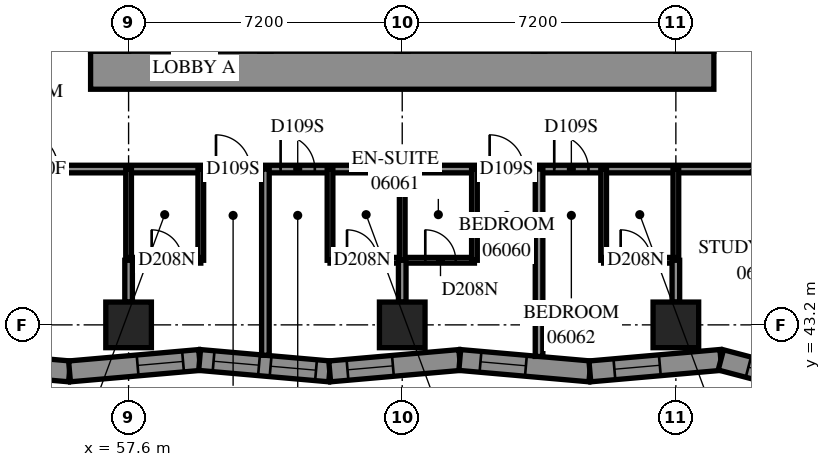
"""IFC4 building model, lengths in metres.
Left out: names, types, materials, properties, quantities, classifications, styles, units other than length and angle.
Written with IfcOpenShell. Run it as: python <this file> out.ifc"""

import sys

from ifc_helpers import new_model, si_unit, direction, frame, frame_2d, origin, origin_2d, place, context, subcontext, project, spatial, polyline, rectangle, outline, extrude, element, fill, save


model = new_model("IFC4")
c1 = context("Model", 3, precision=1e-05, world=origin(), true_north=direction((0.0, 1.0)))
c2 = subcontext(c1, "Body", "Model", "MODEL_VIEW")
j1 = project(units=[si_unit("LENGTHUNIT", "METRE"), si_unit("PLANEANGLEUNIT", "RADIAN")], contexts=[c1])
p1 = place(None, origin())
s1 = spatial("IfcSite", under=j1, at=p1, CompositionType="ELEMENT")
p2 = place(p1, origin())
s2 = spatial("IfcBuilding", under=s1, at=p2, CompositionType="ELEMENT")
p3 = place(p2, frame((0.0, 0.0, 27.0)))
s3 = spatial("IfcBuildingStorey", under=s2, at=p3, CompositionType="ELEMENT", Elevation=27.0)
for number, where, z_axis, x_axis in (
    (1, (57.6, 43.2, 0.0), (0.0, 0.0, 1.0), (1.0, 0.0, 0.0)),
    (2, (64.8, 43.2, 0.0), (0.0, 0.0, 1.0), (1.0, 0.0, 0.0)),
    (3, (72.0, 43.2, 0.0), (0.0, 0.0, 1.0), (1.0, 0.0, 0.0)),
):
    element("IfcColumn", number, at=place(p3, frame(where, z_axis=z_axis, x_axis=x_axis)), inside=s3, PredefinedType="COLUMN", context=c2, shape_type="SweptSolid", body=[
        extrude(rectangle(XDim=1.2, YDim=1.2, at=origin_2d()), origin(), (0.0, 0.0, 1.0), 3.1),
    ])
p4 = place(p3, frame((56.6, 49.9, -0.3), z_axis=(0.0, 0.0, 1.0), x_axis=(1.0, 0.0, 0.0)))
e4 = element("IfcWall", 4, at=p4, inside=s3, PredefinedType="SHEAR", context=c2, shape_type="SweptSolid", body=[
    extrude(rectangle(XDim=16.4, YDim=1.0, at=frame_2d((8.2, 0.0))), origin(), (0.0, 0.0, 1.0), 2.7),
])
p5 = place(p3, frame((52.599, 42.278, 0.0), z_axis=(0.0, 0.0, 1.0), x_axis=(0.9961831061, -0.0872881385, 0.0)))
e5 = element("IfcWall", 5, at=p5, inside=s3, PredefinedType="SOLIDWALL", context=c2, shape_type="SweptSolid", body=[
    extrude(outline(polyline([(0.048, -0.275), (3.484, -0.275), (3.436, 0.275), (-0.048, 0.275), (0.048, -0.275)])), origin(), (0.0, 0.0, 1.0), 3.1),
])
p6 = place(p5, frame((1.721, 0.0, 0.5)))
e6 = element("IfcOpeningElement", 6, at=p6, cuts=e5, PredefinedType="OPENING", context=c2, shape_type="SweptSolid", body=[
    extrude(rectangle(XDim=1.2, YDim=2.45, at=frame_2d((0.6, 1.225))), frame((0.0, 0.285, 0.0), z_axis=(0.0, -1.0, 0.0), x_axis=(1.0, 0.0, 0.0)), (0.0, 0.0, 1.0), 0.57),
])
p7 = place(p3, frame((56.046, 41.976, 0.0), z_axis=(0.0, 0.0, 1.0), x_axis=(0.996181166, 0.0873102778, 0.0)))
e7 = element("IfcWall", 7, at=p7, inside=s3, PredefinedType="SOLIDWALL", context=c2, shape_type="SweptSolid", body=[
    extrude(outline(polyline([(-0.024, -0.275), (3.412, -0.275), (3.46, 0.275), (0.024, 0.275), (-0.024, -0.275)])), origin(), (0.0, 0.0, 1.0), 3.1),
])
p8 = place(p7, frame((1.798, 0.0, 0.5)))
e8 = element("IfcOpeningElement", 8, at=p8, cuts=e7, PredefinedType="OPENING", context=c2, shape_type="SweptSolid", body=[
    extrude(rectangle(XDim=1.2, YDim=2.45, at=frame_2d((0.6, 1.225))), frame((0.0, 0.285, 0.0), z_axis=(0.0, -1.0, 0.0), x_axis=(1.0, 0.0, 0.0)), (0.0, 0.0, 1.0), 0.57),
])
p9 = place(p3, frame((59.469, 42.276, 0.0), z_axis=(0.0, 0.0, 1.0), x_axis=(0.996181166, -0.0873102778, 0.0)))
e9 = element("IfcWall", 9, at=p9, inside=s3, PredefinedType="SOLIDWALL", context=c2, shape_type="SweptSolid", body=[
    extrude(outline(polyline([(0.024, -0.275), (3.46, -0.275), (3.412, 0.275), (-0.024, 0.275), (0.024, -0.275)])), origin(), (0.0, 0.0, 1.0), 3.1),
])
p10 = place(p9, frame((0.369, 0.0, 0.5)))
e10 = element("IfcOpeningElement", 10, at=p10, cuts=e9, PredefinedType="OPENING", context=c2, shape_type="SweptSolid", body=[
    extrude(rectangle(XDim=1.2, YDim=2.45, at=frame_2d((0.6, 1.225))), frame((0.0, 0.285, 0.0), z_axis=(0.0, -1.0, 0.0), x_axis=(1.0, 0.0, 0.0)), (0.0, 0.0, 1.0), 0.57),
])
p11 = place(p9, frame((1.875, 0.0, 0.5)))
e11 = element("IfcOpeningElement", 11, at=p11, cuts=e9, PredefinedType="OPENING", context=c2, shape_type="SweptSolid", body=[
    extrude(rectangle(XDim=1.2, YDim=2.45, at=frame_2d((0.6, 1.225))), frame((0.0, 0.285, 0.0), z_axis=(0.0, -1.0, 0.0), x_axis=(1.0, 0.0, 0.0)), (0.0, 0.0, 1.0), 0.57),
])
p12 = place(p3, frame((62.892, 41.976, 0.0), z_axis=(0.0, 0.0, 1.0), x_axis=(0.9961809441, 0.0873128092, 0.0)))
e12 = element("IfcWall", 12, at=p12, inside=s3, PredefinedType="SOLIDWALL", context=c2, shape_type="SweptSolid", body=[
    extrude(outline(polyline([(-0.024, -0.275), (3.412, -0.275), (3.46, 0.275), (0.024, 0.275), (-0.024, -0.275)])), origin(), (0.0, 0.0, 1.0), 3.1),
])
p13 = place(p12, frame((0.47, 0.0, 0.5)))
e13 = element("IfcOpeningElement", 13, at=p13, cuts=e12, PredefinedType="OPENING", context=c2, shape_type="SweptSolid", body=[
    extrude(rectangle(XDim=1.2, YDim=2.45, at=frame_2d((0.6, 1.225))), frame((0.0, 0.285, 0.0), z_axis=(0.0, -1.0, 0.0), x_axis=(1.0, 0.0, 0.0)), (0.0, 0.0, 1.0), 0.57),
])
p14 = place(p3, frame((66.314, 42.276, 0.0), z_axis=(0.0, 0.0, 1.0), x_axis=(0.996181166, -0.0873102778, 0.0)))
e14 = element("IfcWall", 14, at=p14, inside=s3, PredefinedType="SOLIDWALL", context=c2, shape_type="SweptSolid", body=[
    extrude(outline(polyline([(0.024, -0.275), (3.46, -0.275), (3.412, 0.275), (-0.024, 0.275), (0.024, -0.275)])), origin(), (0.0, 0.0, 1.0), 3.1),
])
p15 = place(p14, frame((0.547, 0.0, 0.5)))
e15 = element("IfcOpeningElement", 15, at=p15, cuts=e14, PredefinedType="OPENING", context=c2, shape_type="SweptSolid", body=[
    extrude(rectangle(XDim=1.2, YDim=2.45, at=frame_2d((0.6, 1.225))), frame((0.0, 0.285, 0.0), z_axis=(0.0, -1.0, 0.0), x_axis=(1.0, 0.0, 0.0)), (0.0, 0.0, 1.0), 0.57),
])
p16 = place(p3, frame((69.737, 41.976, 0.0), z_axis=(0.0, 0.0, 1.0), x_axis=(0.9961831061, 0.0872881385, 0.0)))
e16 = element("IfcWall", 16, at=p16, inside=s3, PredefinedType="SOLIDWALL", context=c2, shape_type="SweptSolid", body=[
    extrude(outline(polyline([(-0.024, -0.275), (3.412, -0.275), (3.508, 0.275), (0.024, 0.275), (-0.024, -0.275)])), origin(), (0.0, 0.0, 1.0), 3.1),
])
p17 = place(p16, frame((0.648, 0.0, 0.5)))
e17 = element("IfcOpeningElement", 17, at=p17, cuts=e16, PredefinedType="OPENING", context=c2, shape_type="SweptSolid", body=[
    extrude(rectangle(XDim=1.2, YDim=2.45, at=frame_2d((0.6, 1.225))), frame((0.0, 0.285, 0.0), z_axis=(0.0, -1.0, 0.0), x_axis=(1.0, 0.0, 0.0)), (0.0, 0.0, 1.0), 0.57),
])
p18 = place(p3, frame((73.184, 42.278, 0.0), z_axis=(0.0, 0.0, 1.0), x_axis=(0.9671305585, -0.2542803232, 0.0)))
e18 = element("IfcWall", 18, at=p18, inside=s3, PredefinedType="SOLIDWALL", context=c2, shape_type="SweptSolid", body=[
    extrude(outline(polyline([(0.048, -0.275), (3.587, -0.275), (3.67, 0.275), (-0.048, 0.275), (0.048, -0.275)])), origin(), (0.0, 0.0, 1.0), 3.1),
])
p19 = place(p18, frame((0.749, 0.0, 0.5)))
e19 = element("IfcOpeningElement", 19, at=p19, cuts=e18, PredefinedType="OPENING", context=c2, shape_type="SweptSolid", body=[
    extrude(rectangle(XDim=1.2, YDim=2.45, at=frame_2d((0.6, 1.225))), frame((0.0, 0.285, 0.0), z_axis=(0.0, -1.0, 0.0), x_axis=(1.0, 0.0, 0.0)), (0.0, 0.0, 1.0), 0.57),
])
p20 = place(p3, frame((54.5, 47.3, 0.0), z_axis=(0.0, 0.0, 1.0), x_axis=(1.0, 0.0, 0.0)))
e20 = element("IfcWall", 20, at=p20, inside=s3, PredefinedType="PARTITIONING", context=c2, shape_type="SweptSolid", body=[
    extrude(rectangle(XDim=19.56, YDim=0.2, at=frame_2d((9.78, 0.0))), origin(), (0.0, 0.0, 1.0), 3.1),
])
p21 = place(p20, frame((0.243, 0.0, 0.0)))
e21 = element("IfcOpeningElement", 21, at=p21, cuts=e20, PredefinedType="OPENING", context=c2, shape_type="SweptSolid", body=[
    extrude(rectangle(XDim=1.0, YDim=2.1, at=frame_2d((0.5, 1.05))), frame((0.0, 0.11, 0.0), z_axis=(0.0, -1.0, 0.0), x_axis=(1.0, 0.0, 0.0)), (0.0, 0.0, 1.0), 0.22),
])
p22 = place(p20, frame((5.4, 0.0, 0.0)))
e22 = element("IfcOpeningElement", 22, at=p22, cuts=e20, PredefinedType="OPENING", context=c2, shape_type="SweptSolid", body=[
    extrude(rectangle(XDim=0.9, YDim=2.1, at=frame_2d((0.45, 1.05))), frame((0.0, 0.11, 0.0), z_axis=(0.0, -1.0, 0.0), x_axis=(1.0, 0.0, 0.0)), (0.0, 0.0, 1.0), 0.22),
])
p23 = place(p20, frame((7.1, 0.0, 0.0)))
e23 = element("IfcOpeningElement", 23, at=p23, cuts=e20, PredefinedType="OPENING", context=c2, shape_type="SweptSolid", body=[
    extrude(rectangle(XDim=0.9, YDim=2.1, at=frame_2d((0.45, 1.05))), frame((0.0, 0.11, 0.0), z_axis=(0.0, -1.0, 0.0), x_axis=(1.0, 0.0, 0.0)), (0.0, 0.0, 1.0), 0.22),
])
p24 = place(p20, frame((12.6, 0.0, 0.0)))
e24 = element("IfcOpeningElement", 24, at=p24, cuts=e20, PredefinedType="OPENING", context=c2, shape_type="SweptSolid", body=[
    extrude(rectangle(XDim=0.9, YDim=2.1, at=frame_2d((0.45, 1.05))), frame((0.0, 0.11, 0.0), z_axis=(0.0, -1.0, 0.0), x_axis=(1.0, 0.0, 0.0)), (0.0, 0.0, 1.0), 0.22),
])
p25 = place(p20, frame((14.3, 0.0, 0.0)))
e25 = element("IfcOpeningElement", 25, at=p25, cuts=e20, PredefinedType="OPENING", context=c2, shape_type="SweptSolid", body=[
    extrude(rectangle(XDim=0.9, YDim=2.1, at=frame_2d((0.45, 1.05))), frame((0.0, 0.11, 0.0), z_axis=(0.0, -1.0, 0.0), x_axis=(1.0, 0.0, 0.0)), (0.0, 0.0, 1.0), 0.22),
])
p26 = place(p3, frame((68.4, 42.369, 0.0), z_axis=(0.0, 0.0, 1.0), x_axis=(0.0, 1.0, 0.0)))
e26 = element("IfcWall", 26, at=p26, inside=s3, PredefinedType="PARTITIONING", context=c2, shape_type="SweptSolid", body=[
    extrude(rectangle(XDim=4.931, YDim=0.2, at=frame_2d((2.465, 0.0))), origin(), (0.0, 0.0, 1.0), 3.1),
])
p27 = place(p3, frame((61.2, 42.4, 0.0), z_axis=(0.0, 0.0, 1.0), x_axis=(0.0, 1.0, 0.0)))
e27 = element("IfcWall", 27, at=p27, inside=s3, PredefinedType="PARTITIONING", context=c2, shape_type="SweptSolid", body=[
    extrude(rectangle(XDim=4.9, YDim=0.2, at=frame_2d((2.45, 0.0))), origin(), (0.0, 0.0, 1.0), 3.1),
])
p28 = place(p3, frame((74.057, 47.297, 0.0), z_axis=(0.0, 0.0, 1.0), x_axis=(0.7071067812, -0.7071067812, 0.0)))
e28 = element("IfcWall", 28, at=p28, inside=s3, PredefinedType="PARTITIONING", context=c2, shape_type="SweptSolid", body=[
    extrude(rectangle(XDim=4.653, YDim=0.2, at=frame_2d((2.326, 0.0))), origin(), (0.0, 0.0, 1.0), 3.1),
])
p29 = place(p28, frame((0.57, 0.0, 0.0)))
e29 = element("IfcOpeningElement", 29, at=p29, cuts=e28, PredefinedType="OPENING", context=c2, shape_type="SweptSolid", body=[
    extrude(rectangle(XDim=1.0, YDim=2.1, at=frame_2d((0.5, 1.05))), frame((0.0, 0.11, 0.0), z_axis=(0.0, -1.0, 0.0), x_axis=(1.0, 0.0, 0.0)), (0.0, 0.0, 1.0), 0.22),
])
p30 = place(p3, frame((62.9, 44.9, 0.0), z_axis=(0.0, 0.0, 1.0), x_axis=(1.0, 0.0, 0.0)))
e30 = element("IfcWall", 30, at=p30, inside=s3, PredefinedType="PARTITIONING", context=c2, shape_type="SweptSolid", body=[
    extrude(rectangle(XDim=3.8, YDim=0.15, at=frame_2d((1.9, 0.0))), origin(), (0.0, 0.0, 1.0), 3.1),
])
p31 = place(p30, frame((0.448, 0.0, 0.0)))
e31 = element("IfcOpeningElement", 31, at=p31, cuts=e30, PredefinedType="OPENING", context=c2, shape_type="SweptSolid", body=[
    extrude(rectangle(XDim=0.8, YDim=2.1, at=frame_2d((0.4, 1.05))), frame((0.0, 0.085, 0.0), z_axis=(0.0, -1.0, 0.0), x_axis=(1.0, 0.0, 0.0)), (0.0, 0.0, 1.0), 0.17),
])
p32 = place(p30, frame((2.507, 0.0, 0.0)))
e32 = element("IfcOpeningElement", 32, at=p32, cuts=e30, PredefinedType="OPENING", context=c2, shape_type="SweptSolid", body=[
    extrude(rectangle(XDim=0.8, YDim=2.1, at=frame_2d((0.4, 1.05))), frame((0.0, 0.085, 0.0), z_axis=(0.0, -1.0, 0.0), x_axis=(1.0, 0.0, 0.0)), (0.0, 0.0, 1.0), 0.17),
])
for number, where, z_axis, x_axis in (
    (33, (59.5, 44.9, 0.0), (0.0, 0.0, 1.0), (0.0, 1.0, 0.0)),
    (34, (57.6, 44.9, 0.0), (0.0, 0.0, 1.0), (0.0, 1.0, 0.0)),
    (35, (62.9, 44.9, 0.0), (0.0, 0.0, 1.0), (0.0, 1.0, 0.0)),
    (36, (66.7, 44.9, 0.0), (0.0, 0.0, 1.0), (0.0, 1.0, 0.0)),
    (37, (64.8, 44.9, 0.0), (0.0, 0.0, 1.0), (0.0, 1.0, 0.0)),
    (38, (70.1, 44.9, 0.0), (0.0, 0.0, 1.0), (0.0, 1.0, 0.0)),
    (39, (72.0, 44.9, 0.0), (0.0, 0.0, 1.0), (0.0, 1.0, 0.0)),
):
    element("IfcWall", number, at=place(p3, frame(where, z_axis=z_axis, x_axis=x_axis)), inside=s3, PredefinedType="PARTITIONING", context=c2, shape_type="SweptSolid", body=[
        extrude(rectangle(XDim=2.4, YDim=0.15, at=frame_2d((1.2, 0.0))), origin(), (0.0, 0.0, 1.0), 3.1),
    ])
p33 = place(p3, frame((70.1, 44.9, 0.0), z_axis=(0.0, 0.0, 1.0), x_axis=(1.0, 0.0, 0.0)))
e40 = element("IfcWall", 40, at=p33, inside=s3, PredefinedType="PARTITIONING", context=c2, shape_type="SweptSolid", body=[
    extrude(rectangle(XDim=1.9, YDim=0.15, at=frame_2d((0.95, 0.0))), origin(), (0.0, 0.0, 1.0), 3.1),
])
p34 = place(p33, frame((0.448, 0.0, 0.0)))
e41 = element("IfcOpeningElement", 41, at=p34, cuts=e40, PredefinedType="OPENING", context=c2, shape_type="SweptSolid", body=[
    extrude(rectangle(XDim=0.8, YDim=2.1, at=frame_2d((0.4, 1.05))), frame((0.0, 0.085, 0.0), z_axis=(0.0, -1.0, 0.0), x_axis=(1.0, 0.0, 0.0)), (0.0, 0.0, 1.0), 0.17),
])
p35 = place(p3, frame((57.6, 44.9, 0.0), z_axis=(0.0, 0.0, 1.0), x_axis=(1.0, 0.0, 0.0)))
e42 = element("IfcWall", 42, at=p35, inside=s3, PredefinedType="PARTITIONING", context=c2, shape_type="SweptSolid", body=[
    extrude(rectangle(XDim=1.9, YDim=0.15, at=frame_2d((0.95, 0.0))), origin(), (0.0, 0.0, 1.0), 3.1),
])
p36 = place(p35, frame((0.607, 0.0, 0.0)))
e43 = element("IfcOpeningElement", 43, at=p36, cuts=e42, PredefinedType="OPENING", context=c2, shape_type="SweptSolid", body=[
    extrude(rectangle(XDim=0.8, YDim=2.1, at=frame_2d((0.4, 1.05))), frame((0.0, 0.085, 0.0), z_axis=(0.0, -1.0, 0.0), x_axis=(1.0, 0.0, 0.0)), (0.0, 0.0, 1.0), 0.17),
])
for number, where, z_axis, x_axis in (
    (44, (57.6, 43.8, 0.0), (0.0, 0.0, 1.0), (0.0, 1.0, 0.0)),
    (45, (64.8, 43.8, 0.0), (0.0, 0.0, 1.0), (0.0, 1.0, 0.0)),
    (46, (72.0, 43.8, 0.0), (0.0, 0.0, 1.0), (0.0, 1.0, 0.0)),
):
    element("IfcWall", number, at=place(p3, frame(where, z_axis=z_axis, x_axis=x_axis)), inside=s3, PredefinedType="PARTITIONING", context=c2, shape_type="SweptSolid", body=[
        extrude(rectangle(XDim=1.1, YDim=0.2, at=frame_2d((0.55, 0.0))), origin(), (0.0, 0.0, 1.0), 3.1),
    ])
p37 = place(p8, origin())
e47 = element("IfcWindow", 47, at=p37, inside=s3, PartitioningType="SINGLE_PANEL", PredefinedType="WINDOW", context=c2, shape_type="SweptSolid", body=[
    extrude(rectangle(XDim=1.2, YDim=2.45, at=frame_2d((0.6, 1.225))), frame((0.0, 0.155, 0.0), z_axis=(0.0, -1.0, 0.0), x_axis=(1.0, 0.0, 0.0)), (0.0, 0.0, 1.0), 0.06),
])
fill(e8, e47)
p38 = place(p10, origin())
e48 = element("IfcWindow", 48, at=p38, inside=s3, PartitioningType="SINGLE_PANEL", PredefinedType="WINDOW", context=c2, shape_type="SweptSolid", body=[
    extrude(rectangle(XDim=1.2, YDim=2.45, at=frame_2d((0.6, 1.225))), frame((0.0, 0.155, 0.0), z_axis=(0.0, -1.0, 0.0), x_axis=(1.0, 0.0, 0.0)), (0.0, 0.0, 1.0), 0.06),
])
fill(e10, e48)
p39 = place(p11, origin())
e49 = element("IfcWindow", 49, at=p39, inside=s3, PartitioningType="SINGLE_PANEL", PredefinedType="WINDOW", context=c2, shape_type="SweptSolid", body=[
    extrude(rectangle(XDim=1.2, YDim=2.45, at=frame_2d((0.6, 1.225))), frame((0.0, 0.155, 0.0), z_axis=(0.0, -1.0, 0.0), x_axis=(1.0, 0.0, 0.0)), (0.0, 0.0, 1.0), 0.06),
])
fill(e11, e49)
p40 = place(p13, origin())
e50 = element("IfcWindow", 50, at=p40, inside=s3, PartitioningType="SINGLE_PANEL", PredefinedType="WINDOW", context=c2, shape_type="SweptSolid", body=[
    extrude(rectangle(XDim=1.2, YDim=2.45, at=frame_2d((0.6, 1.225))), frame((0.0, 0.155, 0.0), z_axis=(0.0, -1.0, 0.0), x_axis=(1.0, 0.0, 0.0)), (0.0, 0.0, 1.0), 0.06),
])
fill(e13, e50)
p41 = place(p15, origin())
e51 = element("IfcWindow", 51, at=p41, inside=s3, PartitioningType="SINGLE_PANEL", PredefinedType="WINDOW", context=c2, shape_type="SweptSolid", body=[
    extrude(rectangle(XDim=1.2, YDim=2.45, at=frame_2d((0.6, 1.225))), frame((0.0, 0.155, 0.0), z_axis=(0.0, -1.0, 0.0), x_axis=(1.0, 0.0, 0.0)), (0.0, 0.0, 1.0), 0.06),
])
fill(e15, e51)
p42 = place(p17, origin())
e52 = element("IfcWindow", 52, at=p42, inside=s3, PartitioningType="SINGLE_PANEL", PredefinedType="WINDOW", context=c2, shape_type="SweptSolid", body=[
    extrude(rectangle(XDim=1.2, YDim=2.45, at=frame_2d((0.6, 1.225))), frame((0.0, 0.155, 0.0), z_axis=(0.0, -1.0, 0.0), x_axis=(1.0, 0.0, 0.0)), (0.0, 0.0, 1.0), 0.06),
])
fill(e17, e52)
p43 = place(p19, origin())
e53 = element("IfcWindow", 53, at=p43, inside=s3, PartitioningType="SINGLE_PANEL", PredefinedType="WINDOW", context=c2, shape_type="SweptSolid", body=[
    extrude(rectangle(XDim=1.2, YDim=2.45, at=frame_2d((0.6, 1.225))), frame((0.0, 0.155, 0.0), z_axis=(0.0, -1.0, 0.0), x_axis=(1.0, 0.0, 0.0)), (0.0, 0.0, 1.0), 0.06),
])
fill(e19, e53)
p44 = place(p21, origin())
e54 = element("IfcDoor", 54, at=p44, inside=s3, OperationType="SINGLE_SWING_RIGHT", PredefinedType="DOOR", context=c2, shape_type="SweptSolid", body=[
    extrude(rectangle(XDim=1.0, YDim=2.1, at=frame_2d((0.5, 1.05))), frame((0.0, 0.025, 0.0), z_axis=(0.0, -1.0, 0.0), x_axis=(1.0, 0.0, 0.0)), (0.0, 0.0, 1.0), 0.05),
])
fill(e21, e54)
p45 = place(p22, origin())
e55 = element("IfcDoor", 55, at=p45, inside=s3, OperationType="SINGLE_SWING_LEFT", PredefinedType="DOOR", context=c2, shape_type="SweptSolid", body=[
    extrude(rectangle(XDim=0.9, YDim=2.1, at=frame_2d((0.45, 1.05))), frame((0.0, 0.025, 0.0), z_axis=(0.0, -1.0, 0.0), x_axis=(1.0, 0.0, 0.0)), (0.0, 0.0, 1.0), 0.05),
])
fill(e22, e55)
p46 = place(p36, origin())
e56 = element("IfcDoor", 56, at=p46, inside=s3, OperationType="SINGLE_SWING_RIGHT", PredefinedType="DOOR", context=c2, shape_type="SweptSolid", body=[
    extrude(rectangle(XDim=0.8, YDim=2.1, at=frame_2d((0.4, 1.05))), frame((0.0, 0.025, 0.0), z_axis=(0.0, -1.0, 0.0), x_axis=(1.0, 0.0, 0.0)), (0.0, 0.0, 1.0), 0.05),
])
fill(e43, e56)
p47 = place(p23, origin())
e57 = element("IfcDoor", 57, at=p47, inside=s3, OperationType="SINGLE_SWING_RIGHT", PredefinedType="DOOR", context=c2, shape_type="SweptSolid", body=[
    extrude(rectangle(XDim=0.9, YDim=2.1, at=frame_2d((0.45, 1.05))), frame((0.0, 0.025, 0.0), z_axis=(0.0, -1.0, 0.0), x_axis=(1.0, 0.0, 0.0)), (0.0, 0.0, 1.0), 0.05),
])
fill(e23, e57)
p48 = place(p31, origin())
e58 = element("IfcDoor", 58, at=p48, inside=s3, OperationType="SINGLE_SWING_RIGHT", PredefinedType="DOOR", context=c2, shape_type="SweptSolid", body=[
    extrude(rectangle(XDim=0.8, YDim=2.1, at=frame_2d((0.4, 1.05))), frame((0.0, 0.025, 0.0), z_axis=(0.0, -1.0, 0.0), x_axis=(1.0, 0.0, 0.0)), (0.0, 0.0, 1.0), 0.05),
])
fill(e31, e58)
p49 = place(p24, origin())
e59 = element("IfcDoor", 59, at=p49, inside=s3, OperationType="SINGLE_SWING_LEFT", PredefinedType="DOOR", context=c2, shape_type="SweptSolid", body=[
    extrude(rectangle(XDim=0.9, YDim=2.1, at=frame_2d((0.45, 1.05))), frame((0.0, 0.025, 0.0), z_axis=(0.0, -1.0, 0.0), x_axis=(1.0, 0.0, 0.0)), (0.0, 0.0, 1.0), 0.05),
])
fill(e24, e59)
p50 = place(p32, origin())
e60 = element("IfcDoor", 60, at=p50, inside=s3, OperationType="SINGLE_SWING_RIGHT", PredefinedType="DOOR", context=c2, shape_type="SweptSolid", body=[
    extrude(rectangle(XDim=0.8, YDim=2.1, at=frame_2d((0.4, 1.05))), frame((0.0, 0.025, 0.0), z_axis=(0.0, -1.0, 0.0), x_axis=(1.0, 0.0, 0.0)), (0.0, 0.0, 1.0), 0.05),
])
fill(e32, e60)
p51 = place(p25, origin())
e61 = element("IfcDoor", 61, at=p51, inside=s3, OperationType="SINGLE_SWING_RIGHT", PredefinedType="DOOR", context=c2, shape_type="SweptSolid", body=[
    extrude(rectangle(XDim=0.9, YDim=2.1, at=frame_2d((0.45, 1.05))), frame((0.0, 0.025, 0.0), z_axis=(0.0, -1.0, 0.0), x_axis=(1.0, 0.0, 0.0)), (0.0, 0.0, 1.0), 0.05),
])
fill(e25, e61)
p52 = place(p34, origin())
e62 = element("IfcDoor", 62, at=p52, inside=s3, OperationType="SINGLE_SWING_RIGHT", PredefinedType="DOOR", context=c2, shape_type="SweptSolid", body=[
    extrude(rectangle(XDim=0.8, YDim=2.1, at=frame_2d((0.4, 1.05))), frame((0.0, 0.025, 0.0), z_axis=(0.0, -1.0, 0.0), x_axis=(1.0, 0.0, 0.0)), (0.0, 0.0, 1.0), 0.05),
])
fill(e41, e62)
save(model, sys.argv[1])
